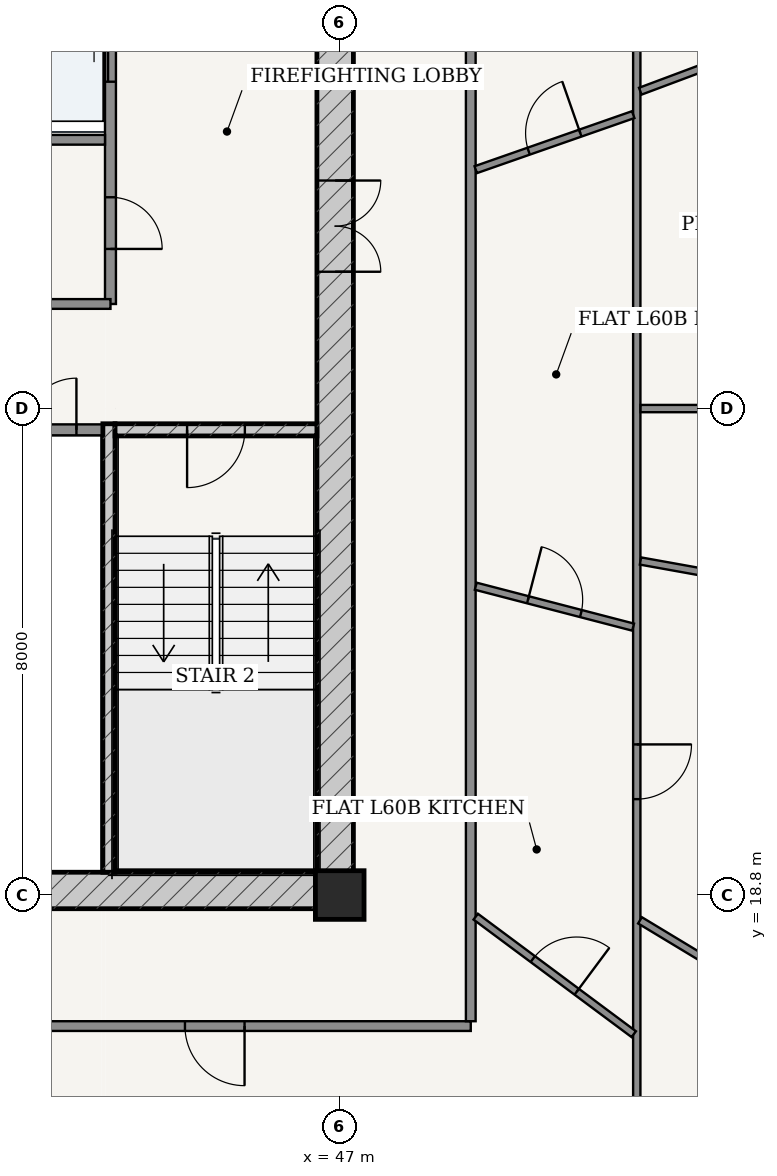
"""IFC4 building model, lengths in metres.
Left out: names, types, materials, properties, quantities, classifications, styles, units other than length and angle.
Written with IfcOpenShell. Run it as: python <this file> out.ifc"""

import sys

from ifc_helpers import new_model, si_unit, direction, frame, frame_2d, origin, origin_2d, place, context, subcontext, project, spatial, rectangle, extrude, source, transform, mapped, element, fill, save


model = new_model("IFC4")
c1 = context("Model", 3, precision=1e-05, world=origin(), true_north=direction((-0.2419218956, 0.970295726276)))
c2 = subcontext(c1, "Body", "Model", "MODEL_VIEW")
j1 = project(units=[si_unit("LENGTHUNIT", "METRE"), si_unit("PLANEANGLEUNIT", "RADIAN")], contexts=[c1])
p1 = place(None, origin())
s1 = spatial("IfcSite", under=j1, at=p1, CompositionType="ELEMENT")
p2 = place(p1, origin())
s2 = spatial("IfcBuilding", under=s1, at=p2, CompositionType="ELEMENT")
p3 = place(p2, frame((0.0, 0.0, 228.2)))
s3 = spatial("IfcBuildingStorey", under=s2, at=p3, CompositionType="ELEMENT", Elevation=228.2)
p4 = place(p3, frame((47.0, 18.8, 0.0), z_axis=(0.0, 0.0, 1.0), x_axis=(1.0, 0.0, 0.0)))
e1 = element("IfcColumn", 1, at=p4, inside=s3, PredefinedType="COLUMN", context=c2, shape_type="SweptSolid", body=[
    extrude(rectangle(XDim=0.8, YDim=0.8, at=origin_2d()), origin(), (0.0, 0.0, 1.0), 3.7),
])
p5 = place(p3, frame((28.775, 18.875, 0.0), z_axis=(0.0, 0.0, 1.0), x_axis=(1.0, 0.0, 0.0)))
e2 = element("IfcWall", 2, at=p5, inside=s3, PredefinedType="SHEAR", context=c2, shape_type="SweptSolid", body=[
    extrude(rectangle(XDim=18.45, YDim=0.6, at=frame_2d((9.225, 0.0))), origin(), (0.0, 0.0, 1.0), 3.435),
])
p6 = place(p5, frame((8.8, 0.0, 0.0)))
e3 = element("IfcOpeningElement", 3, at=p6, cuts=e2, PredefinedType="OPENING", context=c2, shape_type="SweptSolid", body=[
    extrude(rectangle(XDim=0.85, YDim=2.1, at=frame_2d((0.425, 1.05))), frame((0.0, 0.31, 0.0), z_axis=(0.0, -1.0, 0.0), x_axis=(1.0, 0.0, 0.0)), (0.0, 0.0, 1.0), 0.62),
])
p7 = place(p3, frame((46.925, 19.175, 0.0), z_axis=(0.0, 0.0, 1.0), x_axis=(0.0, 1.0, 0.0)))
e4 = element("IfcWall", 4, at=p7, inside=s3, PredefinedType="SHEAR", context=c2, shape_type="SweptSolid", body=[
    extrude(rectangle(XDim=15.25, YDim=0.6, at=frame_2d((7.625, 0.0))), origin(), (0.0, 0.0, 1.0), 3.435),
])
p8 = place(p7, frame((9.875, 0.0, 0.0)))
e5 = element("IfcOpeningElement", 5, at=p8, cuts=e4, PredefinedType="OPENING", context=c2, shape_type="SweptSolid", body=[
    extrude(rectangle(XDim=1.5, YDim=2.2, at=frame_2d((0.75, 1.1))), frame((0.0, 0.31, 0.0), z_axis=(0.0, -1.0, 0.0), x_axis=(1.0, 0.0, 0.0)), (0.0, 0.0, 1.0), 0.62),
])
p9 = place(p3, frame((43.205, 19.175, 0.0), z_axis=(0.0, 0.0, 1.0), x_axis=(0.0, 1.0, 0.0)))
e6 = element("IfcWall", 6, at=p9, inside=s3, PredefinedType="SOLIDWALL", context=c2, shape_type="SweptSolid", body=[
    extrude(rectangle(XDim=7.375, YDim=0.2, at=frame_2d((3.688, 0.0))), origin(), (0.0, 0.0, 1.0), 3.435),
])
p10 = place(p3, frame((43.305, 26.45, 0.0), z_axis=(0.0, 0.0, 1.0), x_axis=(1.0, 0.0, 0.0)))
e7 = element("IfcWall", 7, at=p10, inside=s3, PredefinedType="SOLIDWALL", context=c2, shape_type="SweptSolid", body=[
    extrude(rectangle(XDim=3.32, YDim=0.2, at=frame_2d((1.66, 0.0))), origin(), (0.0, 0.0, 1.0), 3.435),
])
p11 = place(p10, frame((1.185, 0.0, 0.0)))
e8 = element("IfcOpeningElement", 8, at=p11, cuts=e7, PredefinedType="OPENING", context=c2, shape_type="SweptSolid", body=[
    extrude(rectangle(XDim=0.95, YDim=2.15, at=frame_2d((0.475, 1.075))), frame((0.0, 0.11, 0.0), z_axis=(0.0, -1.0, 0.0), x_axis=(1.0, 0.0, 0.0)), (0.0, 0.0, 1.0), 0.22),
])
p12 = place(p3, frame((50.035, 10.391, 0.0), z_axis=(0.0, 0.0, 1.0), x_axis=(0.741986838603, 0.670414447443, 0.0)))
e9 = element("IfcWall", 9, at=p12, inside=s3, PredefinedType="SOLIDWALL", context=c2, shape_type="SweptSolid", body=[
    extrude(rectangle(XDim=8.255, YDim=0.28, at=frame_2d((4.127, 0.0))), origin(), (0.0, 0.0, 1.0), 3.435),
])
p13 = place(p12, frame((1.179, 0.0, 0.85)))
e10 = element("IfcOpeningElement", 10, at=p13, cuts=e9, PredefinedType="OPENING", context=c2, shape_type="SweptSolid", body=[
    extrude(rectangle(XDim=2.1, YDim=1.95, at=frame_2d((1.05, 0.975))), frame((0.0, 0.15, 0.0), z_axis=(0.0, -1.0, 0.0), x_axis=(1.0, 0.0, 0.0)), (0.0, 0.0, 1.0), 0.3),
])
p14 = place(p12, frame((4.976, 0.0, 0.85)))
e11 = element("IfcOpeningElement", 11, at=p14, cuts=e9, PredefinedType="OPENING", context=c2, shape_type="SweptSolid", body=[
    extrude(rectangle(XDim=2.1, YDim=1.95, at=frame_2d((1.05, 0.975))), frame((0.0, 0.15, 0.0), z_axis=(0.0, -1.0, 0.0), x_axis=(1.0, 0.0, 0.0)), (0.0, 0.0, 1.0), 0.3),
])
p15 = place(p3, frame((41.39, 26.45, 0.0), z_axis=(0.0, 0.0, 1.0), x_axis=(1.0, 0.0, 0.0)))
e12 = element("IfcWall", 12, at=p15, inside=s3, PredefinedType="PARTITIONING", context=c2, shape_type="SweptSolid", body=[
    extrude(rectangle(XDim=1.71, YDim=0.18, at=frame_2d((0.855, 0.0))), origin(), (0.0, 0.0, 1.0), 3.435),
])
p16 = place(p15, frame((0.43, 0.0, 0.0)))
e13 = element("IfcOpeningElement", 13, at=p16, cuts=e12, PredefinedType="OPENING", context=c2, shape_type="SweptSolid", body=[
    extrude(rectangle(XDim=0.85, YDim=2.1, at=frame_2d((0.425, 1.05))), frame((0.0, 0.1, 0.0), z_axis=(0.0, -1.0, 0.0), x_axis=(1.0, 0.0, 0.0)), (0.0, 0.0, 1.0), 0.2),
])
p17 = place(p3, frame((43.23, 28.52, 0.0), z_axis=(0.0, 0.0, 1.0), x_axis=(0.0, 1.0, 0.0)))
e14 = element("IfcWall", 14, at=p17, inside=s3, PredefinedType="PARTITIONING", context=c2, shape_type="SweptSolid", body=[
    extrude(rectangle(XDim=5.905, YDim=0.18, at=frame_2d((2.953, 0.0))), origin(), (0.0, 0.0, 1.0), 3.435),
])
p18 = place(p17, frame((0.905, 0.0, 0.0)))
e15 = element("IfcOpeningElement", 15, at=p18, cuts=e14, PredefinedType="OPENING", context=c2, shape_type="SweptSolid", body=[
    extrude(rectangle(XDim=0.85, YDim=2.1, at=frame_2d((0.425, 1.05))), frame((0.0, 0.1, 0.0), z_axis=(0.0, -1.0, 0.0), x_axis=(1.0, 0.0, 0.0)), (0.0, 0.0, 1.0), 0.2),
])
p19 = place(p17, frame((3.655, 0.0, 0.0)))
e16 = element("IfcOpeningElement", 16, at=p19, cuts=e14, PredefinedType="OPENING", context=c2, shape_type="SweptSolid", body=[
    extrude(rectangle(XDim=1.15, YDim=2.2, at=frame_2d((0.575, 1.1))), frame((0.0, 0.1, 0.0), z_axis=(0.0, -1.0, 0.0), x_axis=(1.0, 0.0, 0.0)), (0.0, 0.0, 1.0), 0.2),
])
p20 = place(p3, frame((41.39, 31.22, 0.0), z_axis=(0.0, 0.0, 1.0), x_axis=(1.0, 0.0, 0.0)))
e17 = element("IfcWall", 17, at=p20, inside=s3, PredefinedType="PARTITIONING", context=c2, shape_type="SweptSolid", body=[
    extrude(rectangle(XDim=1.75, YDim=0.16, at=frame_2d((0.875, 0.0))), origin(), (0.0, 0.0, 1.0), 3.435),
])
p21 = place(p3, frame((41.39, 28.52, 0.0), z_axis=(0.0, 0.0, 1.0), x_axis=(1.0, 0.0, 0.0)))
e18 = element("IfcWall", 18, at=p21, inside=s3, PredefinedType="PARTITIONING", context=c2, shape_type="SweptSolid", body=[
    extrude(rectangle(XDim=1.84, YDim=0.16, at=frame_2d((0.92, 0.0))), origin(), (0.0, 0.0, 1.0), 3.435),
])
p22 = place(p3, frame((34.32, 16.645, 0.0), z_axis=(0.0, 0.0, 1.0), x_axis=(1.0, 0.0, 0.0)))
e19 = element("IfcWall", 19, at=p22, inside=s3, PredefinedType="PARTITIONING", context=c2, shape_type="SweptSolid", body=[
    extrude(rectangle(XDim=14.835, YDim=0.16, at=frame_2d((7.417, 0.0))), origin(), (0.0, 0.0, 1.0), 2.951),
])
p23 = place(p22, frame((10.135, 0.0, 0.0)))
e20 = element("IfcOpeningElement", 20, at=p23, cuts=e19, PredefinedType="OPENING", context=c2, shape_type="SweptSolid", body=[
    extrude(rectangle(XDim=0.98, YDim=2.2, at=frame_2d((0.49, 1.1))), frame((0.0, 0.09, 0.0), z_axis=(0.0, -1.0, 0.0), x_axis=(1.0, 0.0, 0.0)), (0.0, 0.0, 1.0), 0.18),
])
p24 = place(p3, frame((49.155, 16.725, 0.0), z_axis=(0.0, 0.0, 1.0), x_axis=(0.0, 1.0, 0.0)))
e21 = element("IfcWall", 21, at=p24, inside=s3, PredefinedType="PARTITIONING", context=c2, shape_type="SweptSolid", body=[
    extrude(rectangle(XDim=18.3, YDim=0.16, at=frame_2d((9.15, 0.0))), origin(), (0.0, 0.0, 1.0), 2.951),
])
p25 = place(p3, frame((51.885, 37.835, 0.0), z_axis=(0.0, 0.0, 1.0), x_axis=(0.0, -1.0, 0.0)))
e22 = element("IfcWall", 22, at=p25, inside=s3, PredefinedType="PARTITIONING", context=c2, shape_type="SweptSolid", body=[
    extrude(rectangle(XDim=23.92, YDim=0.12, at=frame_2d((11.96, 0.0))), origin(), (0.0, 0.0, 1.0), 2.951),
])
p26 = place(p25, frame((16.558, 0.0, 0.0)))
e23 = element("IfcOpeningElement", 23, at=p26, cuts=e22, PredefinedType="OPENING", context=c2, shape_type="SweptSolid", body=[
    extrude(rectangle(XDim=0.9, YDim=2.15, at=frame_2d((0.45, 1.075))), frame((0.0, 0.07, 0.0), z_axis=(0.0, -1.0, 0.0), x_axis=(1.0, 0.0, 0.0)), (0.0, 0.0, 1.0), 0.14),
])
p27 = place(p3, frame((51.938, 18.384, 0.0), z_axis=(0.0, 0.0, 1.0), x_axis=(0.856058483833, -0.516878972543, 0.0)))
e24 = element("IfcWall", 24, at=p27, inside=s3, PredefinedType="PARTITIONING", context=c2, shape_type="SweptSolid", body=[
    extrude(rectangle(XDim=4.787, YDim=0.12, at=frame_2d((2.393, 0.0))), origin(), (0.0, 0.0, 1.0), 2.951),
])
p28 = place(p3, frame((51.946, 24.293, 0.0), z_axis=(0.0, 0.0, 1.0), x_axis=(0.984227185588, -0.176909149424, 0.0)))
e25 = element("IfcWall", 25, at=p28, inside=s3, PredefinedType="PARTITIONING", context=c2, shape_type="SweptSolid", body=[
    extrude(rectangle(XDim=7.448, YDim=0.12, at=frame_2d((3.724, 0.0))), origin(), (0.0, 0.0, 1.0), 2.951),
])
p29 = place(p28, frame((2.264, 0.0, 0.0)))
e26 = element("IfcOpeningElement", 26, at=p29, cuts=e25, PredefinedType="OPENING", context=c2, shape_type="SweptSolid", body=[
    extrude(rectangle(XDim=0.9, YDim=2.15, at=frame_2d((0.45, 1.075))), frame((0.0, 0.07, 0.0), z_axis=(0.0, -1.0, 0.0), x_axis=(1.0, 0.0, 0.0)), (0.0, 0.0, 1.0), 0.14),
])
p30 = place(p3, frame((51.947, 26.8, 0.0), z_axis=(0.0, 0.0, 1.0), x_axis=(1.0, 0.0, 0.0)))
e27 = element("IfcWall", 27, at=p30, inside=s3, PredefinedType="PARTITIONING", context=c2, shape_type="SweptSolid", body=[
    extrude(rectangle(XDim=7.793, YDim=0.12, at=frame_2d((3.896, 0.0))), origin(), (0.0, 0.0, 1.0), 2.951),
])
p31 = place(p30, frame((3.447, 0.0, 0.0)))
e28 = element("IfcOpeningElement", 28, at=p31, cuts=e27, PredefinedType="OPENING", context=c2, shape_type="SweptSolid", body=[
    extrude(rectangle(XDim=0.9, YDim=2.15, at=frame_2d((0.45, 1.075))), frame((0.0, 0.07, 0.0), z_axis=(0.0, -1.0, 0.0), x_axis=(1.0, 0.0, 0.0)), (0.0, 0.0, 1.0), 0.14),
])
p32 = place(p3, frame((51.943, 32.019, 0.0), z_axis=(0.0, 0.0, 1.0), x_axis=(0.936540194592, 0.350560214389, 0.0)))
e29 = element("IfcWall", 29, at=p32, inside=s3, PredefinedType="PARTITIONING", context=c2, shape_type="SweptSolid", body=[
    extrude(rectangle(XDim=6.556, YDim=0.12, at=frame_2d((3.278, 0.0))), origin(), (0.0, 0.0, 1.0), 2.951),
])
p33 = place(p32, frame((2.828, 0.0, 0.0)))
e30 = element("IfcOpeningElement", 30, at=p33, cuts=e29, PredefinedType="OPENING", context=c2, shape_type="SweptSolid", body=[
    extrude(rectangle(XDim=0.9, YDim=2.15, at=frame_2d((0.45, 1.075))), frame((0.0, 0.07, 0.0), z_axis=(0.0, -1.0, 0.0), x_axis=(1.0, 0.0, 0.0)), (0.0, 0.0, 1.0), 0.14),
])
p34 = place(p3, frame((49.237, 18.444, 0.0), z_axis=(0.0, 0.0, 1.0), x_axis=(0.802454010275, -0.596713969497, 0.0)))
e31 = element("IfcWall", 31, at=p34, inside=s3, PredefinedType="PARTITIONING", context=c2, shape_type="SweptSolid", body=[
    extrude(rectangle(XDim=3.238, YDim=0.12, at=frame_2d((1.619, 0.0))), origin(), (0.0, 0.0, 1.0), 3.11),
])
p35 = place(p34, frame((1.169, 0.0, 0.0)))
e32 = element("IfcOpeningElement", 32, at=p35, cuts=e31, PredefinedType="OPENING", context=c2, shape_type="SweptSolid", body=[
    extrude(rectangle(XDim=0.9, YDim=2.15, at=frame_2d((0.45, 1.075))), frame((0.0, 0.07, 0.0), z_axis=(0.0, -1.0, 0.0), x_axis=(1.0, 0.0, 0.0)), (0.0, 0.0, 1.0), 0.14),
])
p36 = place(p3, frame((49.237, 23.879, 0.0), z_axis=(0.0, 0.0, 1.0), x_axis=(0.967822506788, -0.251633851765, 0.0)))
e33 = element("IfcWall", 33, at=p36, inside=s3, PredefinedType="PARTITIONING", context=c2, shape_type="SweptSolid", body=[
    extrude(rectangle(XDim=2.674, YDim=0.12, at=frame_2d((1.337, 0.0))), origin(), (0.0, 0.0, 1.0), 3.435),
])
p37 = place(p36, frame((0.887, 0.0, 0.0)))
e34 = element("IfcOpeningElement", 34, at=p37, cuts=e33, PredefinedType="OPENING", context=c2, shape_type="SweptSolid", body=[
    extrude(rectangle(XDim=0.9, YDim=2.15, at=frame_2d((0.45, 1.075))), frame((0.0, 0.07, 0.0), z_axis=(0.0, -1.0, 0.0), x_axis=(1.0, 0.0, 0.0)), (0.0, 0.0, 1.0), 0.14),
])
p38 = place(p3, frame((49.237, 30.729, 0.0), z_axis=(0.0, 0.0, 1.0), x_axis=(0.94398177501, 0.329997588549, 0.0)))
e35 = element("IfcWall", 35, at=p38, inside=s3, PredefinedType="PARTITIONING", context=c2, shape_type="SweptSolid", body=[
    extrude(rectangle(XDim=2.743, YDim=0.12, at=frame_2d((1.372, 0.0))), origin(), (0.0, 0.0, 1.0), 3.11),
])
p39 = place(p38, frame((0.922, 0.0, 0.0)))
e36 = element("IfcOpeningElement", 36, at=p39, cuts=e35, PredefinedType="OPENING", context=c2, shape_type="SweptSolid", body=[
    extrude(rectangle(XDim=0.9, YDim=2.15, at=frame_2d((0.45, 1.075))), frame((0.0, 0.07, 0.0), z_axis=(0.0, -1.0, 0.0), x_axis=(1.0, 0.0, 0.0)), (0.0, 0.0, 1.0), 0.14),
])
m1 = source(origin(), c2, "Body", "SweptSolid", [
    extrude(rectangle(XDim=1.5, YDim=2.2, at=frame_2d((0.75, 1.1))), frame((0.0, 0.025, 0.0), z_axis=(0.0, -1.0, 0.0), x_axis=(1.0, 0.0, 0.0)), (0.0, 0.0, 1.0), 0.05),
])
p40 = place(p8, frame((1.5, 0.0, 0.0), z_axis=(0.0, 0.0, 1.0), x_axis=(-1.0, 0.0, 0.0)))
e37 = element("IfcDoor", 37, at=p40, inside=s3, OperationType="DOUBLE_DOOR_SINGLE_SWING", PredefinedType="DOOR", context=c2, shape_type="MappedRepresentation", body=[
    mapped(m1, transform((0.0, 0.0, 0.0), scale=1.0)),
])
fill(e5, e37)
m2 = source(origin(), c2, "Body", "SweptSolid", [
    extrude(rectangle(XDim=0.95, YDim=2.15, at=frame_2d((0.475, 1.075))), frame((0.0, 0.025, 0.0), z_axis=(0.0, -1.0, 0.0), x_axis=(1.0, 0.0, 0.0)), (0.0, 0.0, 1.0), 0.05),
])
p41 = place(p11, frame((0.95, 0.0, 0.0), z_axis=(0.0, 0.0, 1.0), x_axis=(-1.0, 0.0, 0.0)))
e38 = element("IfcDoor", 38, at=p41, inside=s3, OperationType="SINGLE_SWING_RIGHT", PredefinedType="DOOR", context=c2, shape_type="MappedRepresentation", body=[
    mapped(m2, transform((0.0, 0.0, 0.0), scale=1.0)),
])
fill(e8, e38)
m3 = source(origin(), c2, "Body", "SweptSolid", [
    extrude(rectangle(XDim=0.85, YDim=2.1, at=frame_2d((0.425, 1.05))), frame((0.0, 0.025, 0.0), z_axis=(0.0, -1.0, 0.0), x_axis=(1.0, 0.0, 0.0)), (0.0, 0.0, 1.0), 0.05),
])
p42 = place(p16, origin())
e39 = element("IfcDoor", 39, at=p42, inside=s3, OperationType="SINGLE_SWING_RIGHT", PredefinedType="DOOR", context=c2, shape_type="MappedRepresentation", body=[
    mapped(m3, transform((0.0, 0.0, 0.0), scale=1.0)),
])
fill(e13, e39)
p43 = place(p18, frame((0.85, 0.0, 0.0), z_axis=(0.0, 0.0, 1.0), x_axis=(-1.0, 0.0, 0.0)))
e40 = element("IfcDoor", 40, at=p43, inside=s3, OperationType="SINGLE_SWING_RIGHT", PredefinedType="DOOR", context=c2, shape_type="MappedRepresentation", body=[
    mapped(m3, transform((0.0, 0.0, 0.0), scale=1.0)),
])
fill(e15, e40)
m4 = source(origin(), c2, "Body", "SweptSolid", [
    extrude(rectangle(XDim=1.15, YDim=2.2, at=frame_2d((0.575, 1.1))), frame((0.0, 0.025, 0.0), z_axis=(0.0, -1.0, 0.0), x_axis=(1.0, 0.0, 0.0)), (0.0, 0.0, 1.0), 0.05),
])
p44 = place(p19, origin())
e41 = element("IfcDoor", 41, at=p44, inside=s3, OperationType="DOUBLE_DOOR_SLIDING", PredefinedType="DOOR", context=c2, shape_type="MappedRepresentation", body=[
    mapped(m4, transform((0.0, 0.0, 0.0), scale=1.0)),
])
fill(e16, e41)
m5 = source(origin(), c2, "Body", "SweptSolid", [
    extrude(rectangle(XDim=0.98, YDim=2.2, at=frame_2d((0.49, 1.1))), frame((0.0, 0.025, 0.0), z_axis=(0.0, -1.0, 0.0), x_axis=(1.0, 0.0, 0.0)), (0.0, 0.0, 1.0), 0.05),
])
p45 = place(p23, frame((0.98, 0.0, 0.0), z_axis=(0.0, 0.0, 1.0), x_axis=(-1.0, 0.0, 0.0)))
e42 = element("IfcDoor", 42, at=p45, inside=s3, OperationType="SINGLE_SWING_LEFT", PredefinedType="DOOR", context=c2, shape_type="MappedRepresentation", body=[
    mapped(m5, transform((0.0, 0.0, 0.0), scale=1.0)),
])
fill(e20, e42)
m6 = source(origin(), c2, "Body", "SweptSolid", [
    extrude(rectangle(XDim=0.9, YDim=2.15, at=frame_2d((0.45, 1.075))), frame((0.0, 0.025, 0.0), z_axis=(0.0, -1.0, 0.0), x_axis=(1.0, 0.0, 0.0)), (0.0, 0.0, 1.0), 0.05),
])
p46 = place(p35, origin())
e43 = element("IfcDoor", 43, at=p46, inside=s3, OperationType="SINGLE_SWING_RIGHT", PredefinedType="DOOR", context=c2, shape_type="MappedRepresentation", body=[
    mapped(m6, transform((0.0, 0.0, 0.0), scale=1.0)),
])
fill(e32, e43)
p47 = place(p37, origin())
e44 = element("IfcDoor", 44, at=p47, inside=s3, OperationType="SINGLE_SWING_LEFT", PredefinedType="DOOR", context=c2, shape_type="MappedRepresentation", body=[
    mapped(m6, transform((0.0, 0.0, 0.0), scale=1.0)),
])
fill(e34, e44)
p48 = place(p39, origin())
e45 = element("IfcDoor", 45, at=p48, inside=s3, OperationType="SINGLE_SWING_RIGHT", PredefinedType="DOOR", context=c2, shape_type="MappedRepresentation", body=[
    mapped(m6, transform((0.0, 0.0, 0.0), scale=1.0)),
])
fill(e36, e45)
p49 = place(p26, origin())
e46 = element("IfcDoor", 46, at=p49, inside=s3, OperationType="SINGLE_SWING_LEFT", PredefinedType="DOOR", context=c2, shape_type="MappedRepresentation", body=[
    mapped(m6, transform((0.0, 0.0, 0.0), scale=1.0)),
])
fill(e23, e46)
save(model, sys.argv[1])
